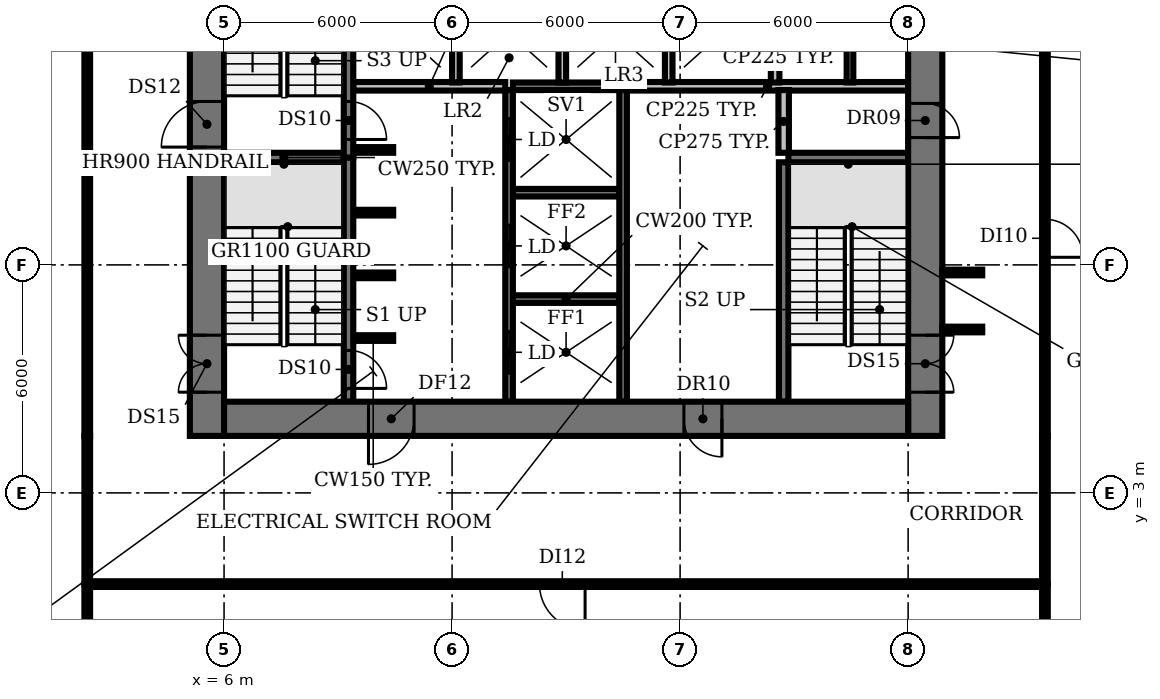
"""IFC4 building model, lengths in metres.
Left out: names, types, materials, properties, quantities, classifications, styles, units other than length and angle.
Written with IfcOpenShell. Run it as: python <this file> out.ifc"""

import sys

from ifc_helpers import new_model, si_unit, direction, frame, frame_2d, origin, place, context, subcontext, project, spatial, rectangle, extrude, element, fill, save


model = new_model("IFC4")
c1 = context("Model", 3, precision=1e-05, world=origin(), true_north=direction((0.0, 1.0)))
c2 = subcontext(c1, "Body", "Model", "MODEL_VIEW")
j1 = project(units=[si_unit("LENGTHUNIT", "METRE"), si_unit("PLANEANGLEUNIT", "RADIAN")], contexts=[c1])
p1 = place(None, origin())
s1 = spatial("IfcSite", under=j1, at=p1, CompositionType="ELEMENT")
p2 = place(p1, origin())
s2 = spatial("IfcBuilding", under=s1, at=p2, CompositionType="ELEMENT")
p3 = place(p2, frame((0.0, 0.0, 62.6)))
s3 = spatial("IfcBuildingStorey", under=s2, at=p3, CompositionType="ELEMENT", Elevation=62.6)
p4 = place(p3, frame((9.4, 7.075, 0.0), z_axis=(0.0, 0.0, 1.0), x_axis=(1.0, 0.0, 0.0)))
e1 = element("IfcWall", 1, at=p4, inside=s3, PredefinedType="SHEAR", context=c2, shape_type="SweptSolid", body=[
    extrude(rectangle(XDim=1.05, YDim=0.15, at=frame_2d((0.525, 0.0))), origin(), (0.0, 0.0, 1.0), 3.85),
])
p5 = place(p3, frame((13.6, 8.1, 0.0), z_axis=(0.0, 0.0, 1.0), x_axis=(1.0, 0.0, 0.0)))
e2 = element("IfcWall", 2, at=p5, inside=s3, PredefinedType="SHEAR", context=c2, shape_type="SweptSolid", body=[
    extrude(rectangle(XDim=2.8, YDim=0.2, at=frame_2d((1.4, 0.0))), origin(), (0.0, 0.0, 1.0), 3.85),
])
for number, where, z_axis, x_axis in (
    (3, (9.4, 8.725, 0.0), (0.0, 0.0, 1.0), (1.0, 0.0, 0.0)),
    (4, (9.4, 10.375, 0.0), (0.0, 0.0, 1.0), (1.0, 0.0, 0.0)),
):
    element("IfcWall", number, at=place(p3, frame(where, z_axis=z_axis, x_axis=x_axis)), inside=s3, PredefinedType="SHEAR", context=c2, shape_type="SweptSolid", body=[
        extrude(rectangle(XDim=1.05, YDim=0.15, at=frame_2d((0.525, 0.0))), origin(), (0.0, 0.0, 1.0), 3.85),
    ])
p6 = place(p3, frame((13.6, 10.9, 0.0), z_axis=(0.0, 0.0, 1.0), x_axis=(1.0, 0.0, 0.0)))
e5 = element("IfcWall", 5, at=p6, inside=s3, PredefinedType="SHEAR", context=c2, shape_type="SweptSolid", body=[
    extrude(rectangle(XDim=2.8, YDim=0.2, at=frame_2d((1.4, 0.0))), origin(), (0.0, 0.0, 1.0), 3.85),
])
for number, where, z_axis, x_axis in (
    (6, (6.0, 11.825, 0.0), (0.0, 0.0, 1.0), (1.0, 0.0, 0.0)),
    (7, (20.85, 11.825, 0.0), (0.0, 0.0, 1.0), (1.0, 0.0, 0.0)),
):
    element("IfcWall", number, at=place(p3, frame(where, z_axis=z_axis, x_axis=x_axis)), inside=s3, PredefinedType="SHEAR", context=c2, shape_type="SweptSolid", body=[
        extrude(rectangle(XDim=3.15, YDim=0.25, at=frame_2d((1.575, 0.0))), origin(), (0.0, 0.0, 1.0), 3.85),
    ])
p7 = place(p3, frame((9.4, 12.025, 0.0), z_axis=(0.0, 0.0, 1.0), x_axis=(1.0, 0.0, 0.0)))
e8 = element("IfcWall", 8, at=p7, inside=s3, PredefinedType="SHEAR", context=c2, shape_type="SweptSolid", body=[
    extrude(rectangle(XDim=1.05, YDim=0.15, at=frame_2d((0.525, 0.0))), origin(), (0.0, 0.0, 1.0), 3.85),
])
p8 = place(p3, frame((9.4, 13.7, 0.0), z_axis=(0.0, 0.0, 1.0), x_axis=(1.0, 0.0, 0.0)))
e9 = element("IfcWall", 9, at=p8, inside=s3, PredefinedType="PARTITIONING", context=c2, shape_type="SweptSolid", body=[
    extrude(rectangle(XDim=4.0, YDim=0.225, at=frame_2d((2.0, 0.0))), origin(), (0.0, 0.0, 1.0), 3.85),
])
p9 = place(p3, frame((13.6, 13.7, 0.0), z_axis=(0.0, 0.0, 1.0), x_axis=(1.0, 0.0, 0.0)))
e10 = element("IfcWall", 10, at=p9, inside=s3, PredefinedType="SHEAR", context=c2, shape_type="SweptSolid", body=[
    extrude(rectangle(XDim=2.8, YDim=0.2, at=frame_2d((1.4, 0.0))), origin(), (0.0, 0.0, 1.0), 3.85),
])
p10 = place(p3, frame((16.6, 13.7, 0.0), z_axis=(0.0, 0.0, 1.0), x_axis=(1.0, 0.0, 0.0)))
e11 = element("IfcWall", 11, at=p10, inside=s3, PredefinedType="PARTITIONING", context=c2, shape_type="SweptSolid", body=[
    extrude(rectangle(XDim=7.4, YDim=0.225, at=frame_2d((3.7, 0.0))), origin(), (0.0, 0.0, 1.0), 3.85),
])
p11 = place(p3, frame((9.275, 11.825, 0.0), z_axis=(0.0, 0.0, 1.0), x_axis=(0.0, -1.0, 0.0)))
e12 = element("IfcWall", 12, at=p11, inside=s3, PredefinedType="SHEAR", context=c2, shape_type="SweptSolid", body=[
    extrude(rectangle(XDim=6.425, YDim=0.25, at=frame_2d((3.212, 0.0))), origin(), (0.0, 0.0, 1.0), 3.85),
])
p12 = place(p11, frame((5.075, 0.0, 0.0)))
e13 = element("IfcOpeningElement", 13, at=p12, cuts=e12, PredefinedType="OPENING", context=c2, shape_type="SweptSolid", body=[
    extrude(rectangle(XDim=1.0, YDim=2.1, at=frame_2d((0.5, 1.05))), frame((0.0, 0.135, 0.0), z_axis=(0.0, -1.0, 0.0), x_axis=(1.0, 0.0, 0.0)), (0.0, 0.0, 1.0), 0.27),
])
p13 = place(p3, frame((9.275, 18.375, 0.0), z_axis=(0.0, 0.0, 1.0), x_axis=(0.0, -1.0, 0.0)))
e14 = element("IfcWall", 14, at=p13, inside=s3, PredefinedType="SHEAR", context=c2, shape_type="SweptSolid", body=[
    extrude(rectangle(XDim=6.55, YDim=0.25, at=frame_2d((3.275, 0.0))), origin(), (0.0, 0.0, 1.0), 3.85),
])
p14 = place(p13, frame((5.075, 0.0, 0.0)))
e15 = element("IfcOpeningElement", 15, at=p14, cuts=e14, PredefinedType="OPENING", context=c2, shape_type="SweptSolid", body=[
    extrude(rectangle(XDim=1.0, YDim=2.1, at=frame_2d((0.5, 1.05))), frame((0.0, 0.135, 0.0), z_axis=(0.0, -1.0, 0.0), x_axis=(1.0, 0.0, 0.0)), (0.0, 0.0, 1.0), 0.27),
])
p15 = place(p3, frame((12.1, 13.8, 0.0), z_axis=(0.0, 0.0, 1.0), x_axis=(0.0, 1.0, 0.0)))
e16 = element("IfcWall", 16, at=p15, inside=s3, PredefinedType="SOLIDWALL", context=c2, shape_type="SweptSolid", body=[
    extrude(rectangle(XDim=2.6, YDim=0.2, at=frame_2d((1.3, 0.0))), origin(), (0.0, 0.0, 1.0), 3.85),
])
p16 = place(p3, frame((13.5, 5.4, 0.0), z_axis=(0.0, 0.0, 1.0), x_axis=(0.0, 1.0, 0.0)))
e17 = element("IfcWall", 17, at=p16, inside=s3, PredefinedType="SHEAR", context=c2, shape_type="SweptSolid", body=[
    extrude(rectangle(XDim=8.2, YDim=0.2, at=frame_2d((4.1, 0.0))), origin(), (0.0, 0.0, 1.0), 3.85),
])
p17 = place(p16, frame((0.75, 0.0, 0.0)))
e18 = element("IfcOpeningElement", 18, at=p17, cuts=e17, PredefinedType="OPENING", context=c2, shape_type="SweptSolid", body=[
    extrude(rectangle(XDim=1.1, YDim=2.1, at=frame_2d((0.55, 1.05))), frame((0.0, 0.11, 0.0), z_axis=(0.0, -1.0, 0.0), x_axis=(1.0, 0.0, 0.0)), (0.0, 0.0, 1.0), 0.22),
])
p18 = place(p16, frame((3.55, 0.0, 0.0)))
e19 = element("IfcOpeningElement", 19, at=p18, cuts=e17, PredefinedType="OPENING", context=c2, shape_type="SweptSolid", body=[
    extrude(rectangle(XDim=1.1, YDim=2.1, at=frame_2d((0.55, 1.05))), frame((0.0, 0.11, 0.0), z_axis=(0.0, -1.0, 0.0), x_axis=(1.0, 0.0, 0.0)), (0.0, 0.0, 1.0), 0.22),
])
p19 = place(p16, frame((6.35, 0.0, 0.0)))
e20 = element("IfcOpeningElement", 20, at=p19, cuts=e17, PredefinedType="OPENING", context=c2, shape_type="SweptSolid", body=[
    extrude(rectangle(XDim=1.1, YDim=2.1, at=frame_2d((0.55, 1.05))), frame((0.0, 0.11, 0.0), z_axis=(0.0, -1.0, 0.0), x_axis=(1.0, 0.0, 0.0)), (0.0, 0.0, 1.0), 0.22),
])
p20 = place(p3, frame((14.9, 13.8, 0.0), z_axis=(0.0, 0.0, 1.0), x_axis=(0.0, 1.0, 0.0)))
e21 = element("IfcWall", 21, at=p20, inside=s3, PredefinedType="SOLIDWALL", context=c2, shape_type="SweptSolid", body=[
    extrude(rectangle(XDim=2.6, YDim=0.2, at=frame_2d((1.3, 0.0))), origin(), (0.0, 0.0, 1.0), 3.85),
])
p21 = place(p3, frame((16.5, 5.4, 0.0), z_axis=(0.0, 0.0, 1.0), x_axis=(0.0, 1.0, 0.0)))
e22 = element("IfcWall", 22, at=p21, inside=s3, PredefinedType="SHEAR", context=c2, shape_type="SweptSolid", body=[
    extrude(rectangle(XDim=8.2, YDim=0.2, at=frame_2d((4.1, 0.0))), origin(), (0.0, 0.0, 1.0), 3.85),
])
p22 = place(p3, frame((17.7, 13.8, 0.0), z_axis=(0.0, 0.0, 1.0), x_axis=(0.0, 1.0, 0.0)))
e23 = element("IfcWall", 23, at=p22, inside=s3, PredefinedType="SOLIDWALL", context=c2, shape_type="SweptSolid", body=[
    extrude(rectangle(XDim=2.6, YDim=0.2, at=frame_2d((1.3, 0.0))), origin(), (0.0, 0.0, 1.0), 3.85),
])
p23 = place(p3, frame((20.5, 13.8, 0.0), z_axis=(0.0, 0.0, 1.0), x_axis=(0.0, 1.0, 0.0)))
e24 = element("IfcWall", 24, at=p23, inside=s3, PredefinedType="PARTITIONING", context=c2, shape_type="SweptSolid", body=[
    extrude(rectangle(XDim=2.6, YDim=0.225, at=frame_2d((1.3, 0.0))), origin(), (0.0, 0.0, 1.0), 3.85),
])
p24 = place(p3, frame((20.725, 5.4, 0.0), z_axis=(0.0, 0.0, 1.0), x_axis=(0.0, 1.0, 0.0)))
e25 = element("IfcWall", 25, at=p24, inside=s3, PredefinedType="SHEAR", context=c2, shape_type="SweptSolid", body=[
    extrude(rectangle(XDim=6.3, YDim=0.25, at=frame_2d((3.15, 0.0))), origin(), (0.0, 0.0, 1.0), 3.85),
])
p25 = place(p3, frame((20.725, 11.95, 0.0), z_axis=(0.0, 0.0, 1.0), x_axis=(0.0, 1.0, 0.0)))
e26 = element("IfcWall", 26, at=p25, inside=s3, PredefinedType="PARTITIONING", context=c2, shape_type="SweptSolid", body=[
    extrude(rectangle(XDim=1.65, YDim=0.275, at=frame_2d((0.825, 0.0))), origin(), (0.0, 0.0, 1.0), 3.85),
])
p26 = place(p3, frame((22.47, 13.8, 0.0), z_axis=(0.0, 0.0, 1.0), x_axis=(0.0, 1.0, 0.0)))
e27 = element("IfcWall", 27, at=p26, inside=s3, PredefinedType="PARTITIONING", context=c2, shape_type="SweptSolid", body=[
    extrude(rectangle(XDim=2.6, YDim=0.175, at=frame_2d((1.3, 0.0))), origin(), (0.0, 0.0, 1.0), 3.85),
])
p27 = place(p3, frame((5.55, 4.5, 0.0), z_axis=(0.0, 0.0, 1.0), x_axis=(0.0, 1.0, 0.0)))
e28 = element("IfcWall", 28, at=p27, inside=s3, PredefinedType="SHEAR", context=c2, shape_type="SweptSolid", body=[
    extrude(rectangle(XDim=21.2, YDim=0.9, at=frame_2d((10.6, 0.0))), origin(), (0.0, 0.0, 1.0), 3.85),
])
p28 = place(p27, frame((1.15, 0.0, 0.0)))
e29 = element("IfcOpeningElement", 29, at=p28, cuts=e28, PredefinedType="OPENING", context=c2, shape_type="SweptSolid", body=[
    extrude(rectangle(XDim=1.5, YDim=2.1, at=frame_2d((0.75, 1.05))), frame((0.0, 0.46, 0.0), z_axis=(0.0, -1.0, 0.0), x_axis=(1.0, 0.0, 0.0)), (0.0, 0.0, 1.0), 0.92),
])
p29 = place(p27, frame((7.6, 0.0, 0.0)))
e30 = element("IfcOpeningElement", 30, at=p29, cuts=e28, PredefinedType="OPENING", context=c2, shape_type="SweptSolid", body=[
    extrude(rectangle(XDim=1.2, YDim=2.1, at=frame_2d((0.6, 1.05))), frame((0.0, 0.46, 0.0), z_axis=(0.0, -1.0, 0.0), x_axis=(1.0, 0.0, 0.0)), (0.0, 0.0, 1.0), 0.92),
])
p30 = place(p27, frame((14.15, 0.0, 0.0)))
e31 = element("IfcOpeningElement", 31, at=p30, cuts=e28, PredefinedType="OPENING", context=c2, shape_type="SweptSolid", body=[
    extrude(rectangle(XDim=1.2, YDim=2.1, at=frame_2d((0.6, 1.05))), frame((0.0, 0.46, 0.0), z_axis=(0.0, -1.0, 0.0), x_axis=(1.0, 0.0, 0.0)), (0.0, 0.0, 1.0), 0.92),
])
p31 = place(p3, frame((24.45, 25.7, 0.0), z_axis=(0.0, 0.0, 1.0), x_axis=(0.0, -1.0, 0.0)))
e32 = element("IfcWall", 32, at=p31, inside=s3, PredefinedType="SHEAR", context=c2, shape_type="SweptSolid", body=[
    extrude(rectangle(XDim=21.2, YDim=0.9, at=frame_2d((10.6, 0.0))), origin(), (0.0, 0.0, 1.0), 3.85),
])
p32 = place(p31, frame((18.55, 0.0, 0.0)))
e33 = element("IfcOpeningElement", 33, at=p32, cuts=e32, PredefinedType="OPENING", context=c2, shape_type="SweptSolid", body=[
    extrude(rectangle(XDim=1.5, YDim=2.1, at=frame_2d((0.75, 1.05))), frame((0.0, 0.46, 0.0), z_axis=(0.0, -1.0, 0.0), x_axis=(1.0, 0.0, 0.0)), (0.0, 0.0, 1.0), 0.92),
])
p33 = place(p31, frame((12.45, 0.0, 0.0)))
e34 = element("IfcOpeningElement", 34, at=p33, cuts=e32, PredefinedType="OPENING", context=c2, shape_type="SweptSolid", body=[
    extrude(rectangle(XDim=0.9, YDim=2.1, at=frame_2d((0.45, 1.05))), frame((0.0, 0.46, 0.0), z_axis=(0.0, -1.0, 0.0), x_axis=(1.0, 0.0, 0.0)), (0.0, 0.0, 1.0), 0.92),
])
p34 = place(p31, frame((6.45, 0.0, 0.0)))
e35 = element("IfcOpeningElement", 35, at=p34, cuts=e32, PredefinedType="OPENING", context=c2, shape_type="SweptSolid", body=[
    extrude(rectangle(XDim=2.0, YDim=2.1, at=frame_2d((1.0, 1.05))), frame((0.0, 0.46, 0.0), z_axis=(0.0, -1.0, 0.0), x_axis=(1.0, 0.0, 0.0)), (0.0, 0.0, 1.0), 0.92),
])
p35 = place(p3, frame((24.0, 4.95, 0.0), z_axis=(0.0, 0.0, 1.0), x_axis=(-1.0, 0.0, 0.0)))
e36 = element("IfcWall", 36, at=p35, inside=s3, PredefinedType="SHEAR", context=c2, shape_type="SweptSolid", body=[
    extrude(rectangle(XDim=18.0, YDim=0.9, at=frame_2d((9.0, 0.0))), origin(), (0.0, 0.0, 1.0), 3.85),
])
p36 = place(p35, frame((13.0, 0.0, 0.0)))
e37 = element("IfcOpeningElement", 37, at=p36, cuts=e36, PredefinedType="OPENING", context=c2, shape_type="SweptSolid", body=[
    extrude(rectangle(XDim=1.2, YDim=2.1, at=frame_2d((0.6, 1.05))), frame((0.0, 0.46, 0.0), z_axis=(0.0, -1.0, 0.0), x_axis=(1.0, 0.0, 0.0)), (0.0, 0.0, 1.0), 0.92),
])
p37 = place(p35, frame((4.9, 0.0, 0.0)))
e38 = element("IfcOpeningElement", 38, at=p37, cuts=e36, PredefinedType="OPENING", context=c2, shape_type="SweptSolid", body=[
    extrude(rectangle(XDim=1.0, YDim=2.1, at=frame_2d((0.5, 1.05))), frame((0.0, 0.46, 0.0), z_axis=(0.0, -1.0, 0.0), x_axis=(1.0, 0.0, 0.0)), (0.0, 0.0, 1.0), 0.92),
])
p38 = place(p3, frame((2.4, -1.753, 0.0), z_axis=(0.0, 0.0, 1.0), x_axis=(0.0, 1.0, 0.0)))
e39 = element("IfcWall", 39, at=p38, inside=s3, PredefinedType="PARTITIONING", context=c2, shape_type="SweptSolid", body=[
    extrude(rectangle(XDim=2.353, YDim=0.15, at=frame_2d((1.177, 0.0))), origin(), (0.0, 0.0, 1.0), 2.83),
])
p39 = place(p3, frame((2.4, 0.6, 0.0), z_axis=(0.0, 0.0, 1.0), x_axis=(0.0, 1.0, 0.0)))
e40 = element("IfcWall", 40, at=p39, inside=s3, PredefinedType="PARTITIONING", context=c2, shape_type="SweptSolid", body=[
    extrude(rectangle(XDim=3.9, YDim=0.15, at=frame_2d((1.95, 0.0))), origin(), (0.0, 0.0, 1.0), 2.83),
])
p40 = place(p3, frame((2.4, 4.5, 0.0), z_axis=(0.0, 0.0, 1.0), x_axis=(0.0, 1.0, 0.0)))
e41 = element("IfcWall", 41, at=p40, inside=s3, PredefinedType="PARTITIONING", context=c2, shape_type="SweptSolid", body=[
    extrude(rectangle(XDim=21.2, YDim=0.15, at=frame_2d((10.6, 0.0))), origin(), (0.0, 0.0, 1.0), 2.83),
])
p41 = place(p40, frame((10.8, 0.0, 0.0)))
e42 = element("IfcOpeningElement", 42, at=p41, cuts=e41, PredefinedType="OPENING", context=c2, shape_type="SweptSolid", body=[
    extrude(rectangle(XDim=1.2, YDim=2.1, at=frame_2d((0.6, 1.05))), frame((0.0, 0.085, 0.0), z_axis=(0.0, -1.0, 0.0), x_axis=(1.0, 0.0, 0.0)), (0.0, 0.0, 1.0), 0.17),
])
for number, where, z_axis, x_axis in (
    (43, (24.9, 7.3, 0.0), (0.0, 0.0, 1.0), (1.0, 0.0, 0.0)),
    (44, (24.9, 8.8, 0.0), (0.0, 0.0, 1.0), (1.0, 0.0, 0.0)),
):
    element("IfcWall", number, at=place(p3, frame(where, z_axis=z_axis, x_axis=x_axis)), inside=s3, PredefinedType="PARTITIONING", context=c2, shape_type="SweptSolid", body=[
        extrude(rectangle(XDim=1.05, YDim=0.15, at=frame_2d((0.525, 0.0))), origin(), (0.0, 0.0, 1.0), 2.83),
    ])
p42 = place(p3, frame((27.6, -5.02, 0.0), z_axis=(0.0, 0.0, 1.0), x_axis=(0.0, 1.0, 0.0)))
e45 = element("IfcWall", 45, at=p42, inside=s3, PredefinedType="PARTITIONING", context=c2, shape_type="SweptSolid", body=[
    extrude(rectangle(XDim=5.62, YDim=0.15, at=frame_2d((2.81, 0.0))), origin(), (0.0, 0.0, 1.0), 2.83),
])
p43 = place(p3, frame((27.6, 0.6, 0.0), z_axis=(0.0, 0.0, 1.0), x_axis=(-1.0, 0.0, 0.0)))
e46 = element("IfcWall", 46, at=p43, inside=s3, PredefinedType="PARTITIONING", context=c2, shape_type="SweptSolid", body=[
    extrude(rectangle(XDim=25.2, YDim=0.15, at=frame_2d((12.6, 0.0))), origin(), (0.0, 0.0, 1.0), 2.83),
])
p44 = place(p43, frame((12.1, 0.0, 0.0)))
e47 = element("IfcOpeningElement", 47, at=p44, cuts=e46, PredefinedType="OPENING", context=c2, shape_type="SweptSolid", body=[
    extrude(rectangle(XDim=1.2, YDim=2.1, at=frame_2d((0.6, 1.05))), frame((0.0, 0.085, 0.0), z_axis=(0.0, -1.0, 0.0), x_axis=(1.0, 0.0, 0.0)), (0.0, 0.0, 1.0), 0.17),
])
p45 = place(p3, frame((27.6, 0.6, 0.0), z_axis=(0.0, 0.0, 1.0), x_axis=(0.0, 1.0, 0.0)))
e48 = element("IfcWall", 48, at=p45, inside=s3, PredefinedType="PARTITIONING", context=c2, shape_type="SweptSolid", body=[
    extrude(rectangle(XDim=3.9, YDim=0.15, at=frame_2d((1.95, 0.0))), origin(), (0.0, 0.0, 1.0), 2.83),
])
p46 = place(p3, frame((27.6, 15.0, 0.0), z_axis=(0.0, 0.0, 1.0), x_axis=(0.0, -1.0, 0.0)))
e49 = element("IfcWall", 49, at=p46, inside=s3, PredefinedType="PARTITIONING", context=c2, shape_type="SweptSolid", body=[
    extrude(rectangle(XDim=10.5, YDim=0.15, at=frame_2d((5.25, 0.0))), origin(), (0.0, 0.0, 1.0), 2.83),
])
p47 = place(p46, frame((4.8, 0.0, 0.0)))
e50 = element("IfcOpeningElement", 50, at=p47, cuts=e49, PredefinedType="OPENING", context=c2, shape_type="SweptSolid", body=[
    extrude(rectangle(XDim=1.0, YDim=2.1, at=frame_2d((0.5, 1.05))), frame((0.0, 0.085, 0.0), z_axis=(0.0, -1.0, 0.0), x_axis=(1.0, 0.0, 0.0)), (0.0, 0.0, 1.0), 0.17),
])
p48 = place(p12, origin())
e51 = element("IfcDoor", 51, at=p48, inside=s3, OperationType="SINGLE_SWING_RIGHT", PredefinedType="DOOR", context=c2, shape_type="SweptSolid", body=[
    extrude(rectangle(XDim=1.0, YDim=2.1, at=frame_2d((0.5, 1.05))), frame((0.0, 0.025, 0.0), z_axis=(0.0, -1.0, 0.0), x_axis=(1.0, 0.0, 0.0)), (0.0, 0.0, 1.0), 0.05),
])
fill(e13, e51)
p49 = place(p14, origin())
e52 = element("IfcDoor", 52, at=p49, inside=s3, OperationType="SINGLE_SWING_RIGHT", PredefinedType="DOOR", context=c2, shape_type="SweptSolid", body=[
    extrude(rectangle(XDim=1.0, YDim=2.1, at=frame_2d((0.5, 1.05))), frame((0.0, 0.025, 0.0), z_axis=(0.0, -1.0, 0.0), x_axis=(1.0, 0.0, 0.0)), (0.0, 0.0, 1.0), 0.05),
])
fill(e15, e52)
p50 = place(p17, origin())
e53 = element("IfcDoor", 53, at=p50, inside=s3, OperationType="DOUBLE_DOOR_SLIDING", PredefinedType="DOOR", context=c2, shape_type="SweptSolid", body=[
    extrude(rectangle(XDim=1.1, YDim=2.1, at=frame_2d((0.55, 1.05))), frame((0.0, 0.025, 0.0), z_axis=(0.0, -1.0, 0.0), x_axis=(1.0, 0.0, 0.0)), (0.0, 0.0, 1.0), 0.05),
])
fill(e18, e53)
p51 = place(p18, origin())
e54 = element("IfcDoor", 54, at=p51, inside=s3, OperationType="DOUBLE_DOOR_SLIDING", PredefinedType="DOOR", context=c2, shape_type="SweptSolid", body=[
    extrude(rectangle(XDim=1.1, YDim=2.1, at=frame_2d((0.55, 1.05))), frame((0.0, 0.025, 0.0), z_axis=(0.0, -1.0, 0.0), x_axis=(1.0, 0.0, 0.0)), (0.0, 0.0, 1.0), 0.05),
])
fill(e19, e54)
p52 = place(p19, origin())
e55 = element("IfcDoor", 55, at=p52, inside=s3, OperationType="DOUBLE_DOOR_SLIDING", PredefinedType="DOOR", context=c2, shape_type="SweptSolid", body=[
    extrude(rectangle(XDim=1.1, YDim=2.1, at=frame_2d((0.55, 1.05))), frame((0.0, 0.025, 0.0), z_axis=(0.0, -1.0, 0.0), x_axis=(1.0, 0.0, 0.0)), (0.0, 0.0, 1.0), 0.05),
])
fill(e20, e55)
p53 = place(p28, origin())
e56 = element("IfcDoor", 56, at=p53, inside=s3, OperationType="DOUBLE_DOOR_SINGLE_SWING", PredefinedType="DOOR", context=c2, shape_type="SweptSolid", body=[
    extrude(rectangle(XDim=1.5, YDim=2.1, at=frame_2d((0.75, 1.05))), frame((0.0, 0.025, 0.0), z_axis=(0.0, -1.0, 0.0), x_axis=(1.0, 0.0, 0.0)), (0.0, 0.0, 1.0), 0.05),
])
fill(e29, e56)
p54 = place(p29, origin())
e57 = element("IfcDoor", 57, at=p54, inside=s3, OperationType="SINGLE_SWING_LEFT", PredefinedType="DOOR", context=c2, shape_type="SweptSolid", body=[
    extrude(rectangle(XDim=1.2, YDim=2.1, at=frame_2d((0.6, 1.05))), frame((0.0, 0.025, 0.0), z_axis=(0.0, -1.0, 0.0), x_axis=(1.0, 0.0, 0.0)), (0.0, 0.0, 1.0), 0.05),
])
fill(e30, e57)
p55 = place(p32, origin())
e58 = element("IfcDoor", 58, at=p55, inside=s3, OperationType="DOUBLE_DOOR_SINGLE_SWING", PredefinedType="DOOR", context=c2, shape_type="SweptSolid", body=[
    extrude(rectangle(XDim=1.5, YDim=2.1, at=frame_2d((0.75, 1.05))), frame((0.0, 0.025, 0.0), z_axis=(0.0, -1.0, 0.0), x_axis=(1.0, 0.0, 0.0)), (0.0, 0.0, 1.0), 0.05),
])
fill(e33, e58)
p56 = place(p33, origin())
e59 = element("IfcDoor", 59, at=p56, inside=s3, OperationType="SINGLE_SWING_RIGHT", PredefinedType="DOOR", context=c2, shape_type="SweptSolid", body=[
    extrude(rectangle(XDim=0.9, YDim=2.1, at=frame_2d((0.45, 1.05))), frame((0.0, -0.39, 0.0), z_axis=(0.0, -1.0, 0.0), x_axis=(1.0, 0.0, 0.0)), (0.0, 0.0, 1.0), 0.05),
])
fill(e34, e59)
p57 = place(p36, origin())
e60 = element("IfcDoor", 60, at=p57, inside=s3, OperationType="SINGLE_SWING_RIGHT", PredefinedType="DOOR", context=c2, shape_type="SweptSolid", body=[
    extrude(rectangle(XDim=1.2, YDim=2.1, at=frame_2d((0.6, 1.05))), frame((0.0, 0.025, 0.0), z_axis=(0.0, -1.0, 0.0), x_axis=(1.0, 0.0, 0.0)), (0.0, 0.0, 1.0), 0.05),
])
fill(e37, e60)
p58 = place(p37, origin())
e61 = element("IfcDoor", 61, at=p58, inside=s3, OperationType="SINGLE_SWING_LEFT", PredefinedType="DOOR", context=c2, shape_type="SweptSolid", body=[
    extrude(rectangle(XDim=1.0, YDim=2.1, at=frame_2d((0.5, 1.05))), frame((0.0, -0.39, 0.0), z_axis=(0.0, -1.0, 0.0), x_axis=(1.0, 0.0, 0.0)), (0.0, 0.0, 1.0), 0.05),
])
fill(e38, e61)
p59 = place(p44, origin())
e62 = element("IfcDoor", 62, at=p59, inside=s3, OperationType="SINGLE_SWING_LEFT", PredefinedType="DOOR", context=c2, shape_type="SweptSolid", body=[
    extrude(rectangle(XDim=1.2, YDim=2.1, at=frame_2d((0.6, 1.05))), frame((0.0, 0.025, 0.0), z_axis=(0.0, -1.0, 0.0), x_axis=(1.0, 0.0, 0.0)), (0.0, 0.0, 1.0), 0.05),
])
fill(e47, e62)
p60 = place(p47, origin())
e63 = element("IfcDoor", 63, at=p60, inside=s3, OperationType="SINGLE_SWING_RIGHT", PredefinedType="DOOR", context=c2, shape_type="SweptSolid", body=[
    extrude(rectangle(XDim=1.0, YDim=2.1, at=frame_2d((0.5, 1.05))), frame((0.0, 0.025, 0.0), z_axis=(0.0, -1.0, 0.0), x_axis=(1.0, 0.0, 0.0)), (0.0, 0.0, 1.0), 0.05),
])
fill(e50, e63)
save(model, sys.argv[1])
